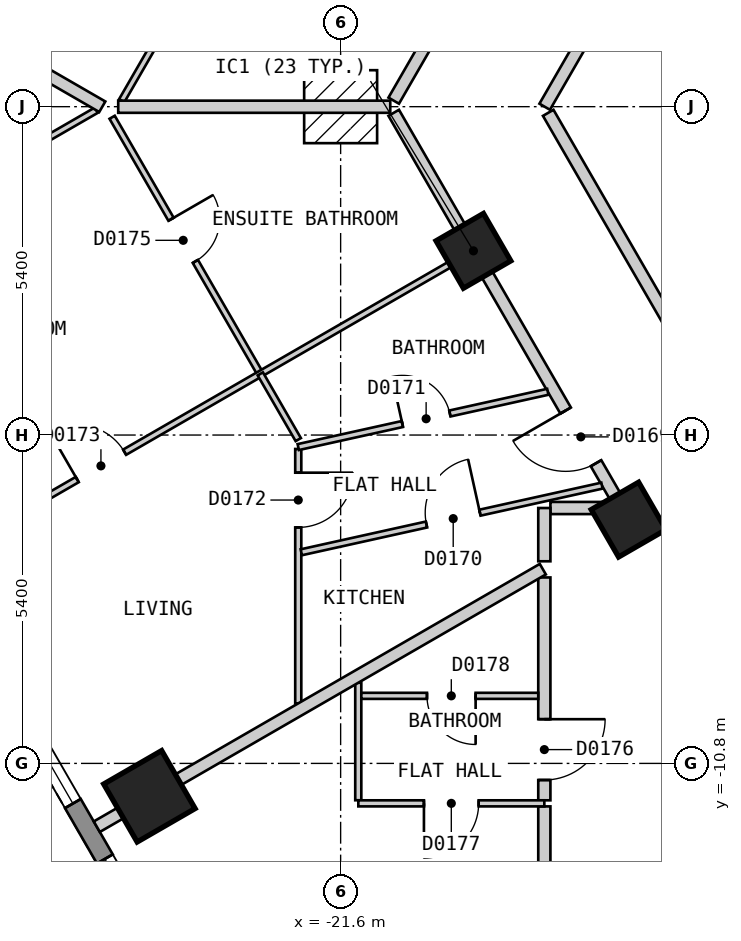
"""IFC4 building model, lengths in metres.
Left out: names, types, materials, properties, quantities, classifications, styles, units other than length and angle.
Written with IfcOpenShell. Run it as: python <this file> out.ifc"""

import sys

from ifc_helpers import new_model, si_unit, direction, frame, frame_2d, origin, origin_2d, place, context, subcontext, project, spatial, polyline, rectangle, outline, extrude, element, fill, save


model = new_model("IFC4")
c1 = context("Model", 3, precision=1e-05, world=origin(), true_north=direction((0.0, 1.0)))
c2 = subcontext(c1, "Body", "Model", "MODEL_VIEW")
j1 = project(units=[si_unit("LENGTHUNIT", "METRE"), si_unit("PLANEANGLEUNIT", "RADIAN")], contexts=[c1])
p1 = place(None, origin())
s1 = spatial("IfcSite", under=j1, at=p1, CompositionType="ELEMENT")
p2 = place(p1, origin())
s2 = spatial("IfcBuilding", under=s1, at=p2, CompositionType="ELEMENT")
p3 = place(p2, frame((0.0, 0.0, 23.4)))
s3 = spatial("IfcBuildingStorey", under=s2, at=p3, CompositionType="ELEMENT", Elevation=23.4)
p4 = place(p3, frame((-24.745, -11.341, 0.0), z_axis=(0.0, 0.0, 1.0), x_axis=(0.499984884929, -0.866034130299, 0.0)))
e1 = element("IfcColumn", 1, at=p4, inside=s3, PredefinedType="COLUMN", context=c2, shape_type="SweptSolid", body=[
    extrude(rectangle(XDim=1.1, YDim=1.1, at=origin_2d()), origin(), (0.0, 0.0, 1.0), 3.0),
])
for number, where, z_axis, x_axis in (
    (2, (-19.416, -2.371, 0.0), (0.0, 0.0, 1.0), (0.5, -0.866, 0.0)),
    (3, (-16.864, -6.791, 0.0), (0.0, 0.0, 1.0), (0.5, -0.866, 0.0)),
):
    element("IfcColumn", number, at=place(p3, frame(where, z_axis=z_axis, x_axis=x_axis)), inside=s3, PredefinedType="COLUMN", context=c2, shape_type="SweptSolid", body=[
        extrude(rectangle(XDim=0.9, YDim=0.9, at=origin_2d()), origin(), (0.0, 0.0, 1.0), 3.0),
    ])
p5 = place(p3, frame((-31.22, -2.425, 0.0), z_axis=(0.0, 0.0, 1.0), x_axis=(0.500001938803, -0.866024284413, 0.0)))
e4 = element("IfcWall", 4, at=p5, inside=s3, PredefinedType="SOLIDWALL", context=c2, shape_type="SweptSolid", body=[
    extrude(outline(polyline([(0.0, -0.15), (27.02, -0.15), (26.94, 0.15), (0.08, 0.15), (0.0, -0.15)])), origin(), (0.0, 0.0, 1.0), 2.7),
])
p6 = place(p5, frame((1.277, 0.0, 0.15)))
e5 = element("IfcOpeningElement", 5, at=p6, cuts=e4, PredefinedType="OPENING", context=c2, shape_type="SweptSolid", body=[
    extrude(rectangle(XDim=1.5, YDim=2.1, at=frame_2d((0.75, 1.05))), frame((0.0, 0.16, 0.0), z_axis=(0.0, -1.0, 0.0), x_axis=(1.0, 0.0, 0.0)), (0.0, 0.0, 1.0), 0.32),
])
p7 = place(p5, frame((3.829, 0.0, 0.15)))
e6 = element("IfcOpeningElement", 6, at=p7, cuts=e4, PredefinedType="OPENING", context=c2, shape_type="SweptSolid", body=[
    extrude(rectangle(XDim=1.5, YDim=2.1, at=frame_2d((0.75, 1.05))), frame((0.0, 0.16, 0.0), z_axis=(0.0, -1.0, 0.0), x_axis=(1.0, 0.0, 0.0)), (0.0, 0.0, 1.0), 0.32),
])
p8 = place(p5, frame((6.382, 0.0, 0.15)))
e7 = element("IfcOpeningElement", 7, at=p8, cuts=e4, PredefinedType="OPENING", context=c2, shape_type="SweptSolid", body=[
    extrude(rectangle(XDim=1.5, YDim=2.1, at=frame_2d((0.75, 1.05))), frame((0.0, 0.16, 0.0), z_axis=(0.0, -1.0, 0.0), x_axis=(1.0, 0.0, 0.0)), (0.0, 0.0, 1.0), 0.32),
])
p9 = place(p5, frame((8.933, 0.0, 0.15)))
e8 = element("IfcOpeningElement", 8, at=p9, cuts=e4, PredefinedType="OPENING", context=c2, shape_type="SweptSolid", body=[
    extrude(rectangle(XDim=1.5, YDim=2.1, at=frame_2d((0.75, 1.05))), frame((0.0, 0.16, 0.0), z_axis=(0.0, -1.0, 0.0), x_axis=(1.0, 0.0, 0.0)), (0.0, 0.0, 1.0), 0.32),
])
p10 = place(p5, frame((11.485, 0.0, 0.15)))
e9 = element("IfcOpeningElement", 9, at=p10, cuts=e4, PredefinedType="OPENING", context=c2, shape_type="SweptSolid", body=[
    extrude(rectangle(XDim=1.5, YDim=2.1, at=frame_2d((0.75, 1.05))), frame((0.0, 0.16, 0.0), z_axis=(0.0, -1.0, 0.0), x_axis=(1.0, 0.0, 0.0)), (0.0, 0.0, 1.0), 0.32),
])
p11 = place(p5, frame((14.037, 0.0, 0.15)))
e10 = element("IfcOpeningElement", 10, at=p11, cuts=e4, PredefinedType="OPENING", context=c2, shape_type="SweptSolid", body=[
    extrude(rectangle(XDim=1.5, YDim=2.1, at=frame_2d((0.75, 1.05))), frame((0.0, 0.16, 0.0), z_axis=(0.0, -1.0, 0.0), x_axis=(1.0, 0.0, 0.0)), (0.0, 0.0, 1.0), 0.32),
])
p12 = place(p5, frame((16.589, 0.0, 0.15)))
e11 = element("IfcOpeningElement", 11, at=p12, cuts=e4, PredefinedType="OPENING", context=c2, shape_type="SweptSolid", body=[
    extrude(rectangle(XDim=1.5, YDim=2.1, at=frame_2d((0.75, 1.05))), frame((0.0, 0.16, 0.0), z_axis=(0.0, -1.0, 0.0), x_axis=(1.0, 0.0, 0.0)), (0.0, 0.0, 1.0), 0.32),
])
p13 = place(p5, frame((19.141, 0.0, 0.15)))
e12 = element("IfcOpeningElement", 12, at=p13, cuts=e4, PredefinedType="OPENING", context=c2, shape_type="SweptSolid", body=[
    extrude(rectangle(XDim=1.5, YDim=2.1, at=frame_2d((0.75, 1.05))), frame((0.0, 0.16, 0.0), z_axis=(0.0, -1.0, 0.0), x_axis=(1.0, 0.0, 0.0)), (0.0, 0.0, 1.0), 0.32),
])
p14 = place(p5, frame((21.693, 0.0, 0.15)))
e13 = element("IfcOpeningElement", 13, at=p14, cuts=e4, PredefinedType="OPENING", context=c2, shape_type="SweptSolid", body=[
    extrude(rectangle(XDim=1.5, YDim=2.1, at=frame_2d((0.75, 1.05))), frame((0.0, 0.16, 0.0), z_axis=(0.0, -1.0, 0.0), x_axis=(1.0, 0.0, 0.0)), (0.0, 0.0, 1.0), 0.32),
])
p15 = place(p5, frame((24.244, 0.0, 0.15)))
e14 = element("IfcOpeningElement", 14, at=p15, cuts=e4, PredefinedType="OPENING", context=c2, shape_type="SweptSolid", body=[
    extrude(rectangle(XDim=1.5, YDim=2.1, at=frame_2d((0.75, 1.05))), frame((0.0, 0.16, 0.0), z_axis=(0.0, -1.0, 0.0), x_axis=(1.0, 0.0, 0.0)), (0.0, 0.0, 1.0), 0.32),
])
p16 = place(p3, frame((-18.186, -0.101, 0.0), z_axis=(0.0, 0.0, 1.0), x_axis=(0.499997591167, -0.86602679452, 0.0)))
e15 = element("IfcWall", 15, at=p16, inside=s3, PredefinedType="PARTITIONING", context=c2, shape_type="SweptSolid", body=[
    extrude(rectangle(XDim=5.172, YDim=0.2, at=frame_2d((2.586, 0.0))), origin(), (0.0, 0.0, 1.0), 2.7),
])
p17 = place(p3, frame((-20.727, -0.101, 0.0), z_axis=(0.0, 0.0, 1.0), x_axis=(0.500065652488, -0.865987495984, 0.0)))
e16 = element("IfcWall", 16, at=p17, inside=s3, PredefinedType="PARTITIONING", context=c2, shape_type="SweptSolid", body=[
    extrude(rectangle(XDim=7.389, YDim=0.2, at=frame_2d((3.695, 0.0))), origin(), (0.0, 0.0, 1.0), 2.7),
])
p18 = place(p17, frame((5.654, 0.0, 0.0)))
e17 = element("IfcOpeningElement", 17, at=p18, cuts=e16, PredefinedType="OPENING", context=c2, shape_type="SweptSolid", body=[
    extrude(rectangle(XDim=1.0, YDim=2.1, at=frame_2d((0.5, 1.05))), frame((0.0, 0.11, 0.0), z_axis=(0.0, -1.0, 0.0), x_axis=(1.0, 0.0, 0.0)), (0.0, 0.0, 1.0), 0.22),
])
p19 = place(p3, frame((-18.25, -11.507, 0.0), z_axis=(0.0, 0.0, 1.0), x_axis=(0.0, -1.0, 0.0)))
e18 = element("IfcWall", 18, at=p19, inside=s3, PredefinedType="PARTITIONING", context=c2, shape_type="SweptSolid", body=[
    extrude(rectangle(XDim=1.862, YDim=0.2, at=frame_2d((0.931, 0.0))), origin(), (0.0, 0.0, 1.0), 2.7),
])
p20 = place(p3, frame((-18.15, -6.6, 0.0), z_axis=(0.0, 0.0, 1.0), x_axis=(1.0, 0.0, 0.0)))
e19 = element("IfcWall", 19, at=p20, inside=s3, PredefinedType="PARTITIONING", context=c2, shape_type="SweptSolid", body=[
    extrude(rectangle(XDim=1.176, YDim=0.2, at=frame_2d((0.588, 0.0))), origin(), (0.0, 0.0, 1.0), 2.7),
])
p21 = place(p3, frame((-18.244, -0.001, 0.0), z_axis=(0.0, 0.0, 1.0), x_axis=(0.499962999376, 0.866046765051, 0.0)))
e20 = element("IfcWall", 20, at=p21, inside=s3, PredefinedType="PARTITIONING", context=c2, shape_type="SweptSolid", body=[
    extrude(rectangle(XDim=18.245, YDim=0.2, at=frame_2d((9.123, 0.0))), origin(), (0.0, 0.0, 1.0), 2.7),
])
p22 = place(p21, frame((8.672, 0.0, 0.0)))
e21 = element("IfcOpeningElement", 21, at=p22, cuts=e20, PredefinedType="OPENING", context=c2, shape_type="SweptSolid", body=[
    extrude(rectangle(XDim=0.9, YDim=2.1, at=frame_2d((0.45, 1.05))), frame((0.0, 0.11, 0.0), z_axis=(0.0, -1.0, 0.0), x_axis=(1.0, 0.0, 0.0)), (0.0, 0.0, 1.0), 0.22),
])
p23 = place(p3, frame((-20.727, 0.099, 0.0), z_axis=(0.0, 0.0, 1.0), x_axis=(0.499993204491, 0.866029327138, 0.0)))
e22 = element("IfcWall", 22, at=p23, inside=s3, PredefinedType="PARTITIONING", context=c2, shape_type="SweptSolid", body=[
    extrude(rectangle(XDim=20.554, YDim=0.2, at=frame_2d((10.277, 0.0))), origin(), (0.0, 0.0, 1.0), 2.7),
])
p24 = place(p23, frame((14.88, 0.0, 0.0)))
e23 = element("IfcOpeningElement", 23, at=p24, cuts=e22, PredefinedType="OPENING", context=c2, shape_type="SweptSolid", body=[
    extrude(rectangle(XDim=1.0, YDim=2.1, at=frame_2d((0.5, 1.05))), frame((0.0, 0.11, 0.0), z_axis=(0.0, -1.0, 0.0), x_axis=(1.0, 0.0, 0.0)), (0.0, 0.0, 1.0), 0.22),
])
p25 = place(p23, frame((4.673, 0.0, 0.0)))
e24 = element("IfcOpeningElement", 24, at=p25, cuts=e22, PredefinedType="OPENING", context=c2, shape_type="SweptSolid", body=[
    extrude(rectangle(XDim=1.0, YDim=2.1, at=frame_2d((0.5, 1.05))), frame((0.0, 0.11, 0.0), z_axis=(0.0, -1.0, 0.0), x_axis=(1.0, 0.0, 0.0)), (0.0, 0.0, 1.0), 0.22),
])
p26 = place(p3, frame((-18.25, -11.407, 0.0), z_axis=(0.0, 0.0, 1.0), x_axis=(0.0, 1.0, 0.0)))
e25 = element("IfcWall", 25, at=p26, inside=s3, PredefinedType="PARTITIONING", context=c2, shape_type="SweptSolid", body=[
    extrude(rectangle(XDim=3.665, YDim=0.2, at=frame_2d((1.833, 0.0))), origin(), (0.0, 0.0, 1.0), 2.7),
])
p27 = place(p26, frame((0.334, 0.0, 0.0)))
e26 = element("IfcOpeningElement", 26, at=p27, cuts=e25, PredefinedType="OPENING", context=c2, shape_type="SweptSolid", body=[
    extrude(rectangle(XDim=1.0, YDim=2.1, at=frame_2d((0.5, 1.05))), frame((0.0, 0.11, 0.0), z_axis=(0.0, -1.0, 0.0), x_axis=(1.0, 0.0, 0.0)), (0.0, 0.0, 1.0), 0.22),
])
p28 = place(p3, frame((-18.25, -7.476, 0.0), z_axis=(0.0, 0.0, 1.0), x_axis=(0.0, 1.0, 0.0)))
e27 = element("IfcWall", 27, at=p28, inside=s3, PredefinedType="PARTITIONING", context=c2, shape_type="SweptSolid", body=[
    extrude(rectangle(XDim=0.876, YDim=0.2, at=frame_2d((0.438, 0.0))), origin(), (0.0, 0.0, 1.0), 2.7),
])
p29 = place(p3, frame((-25.358, -0.174, 0.0), z_axis=(0.0, 0.0, 1.0), x_axis=(0.500093956194, -0.865971151354, 0.0)))
e28 = element("IfcWall", 28, at=p29, inside=s3, PredefinedType="PARTITIONING", context=c2, shape_type="SweptSolid", body=[
    extrude(rectangle(XDim=4.873, YDim=0.1, at=frame_2d((2.437, 0.0))), origin(), (0.0, 0.0, 1.0), 2.7),
])
p30 = place(p29, frame((1.937, 0.0, 0.0)))
e29 = element("IfcOpeningElement", 29, at=p30, cuts=e28, PredefinedType="OPENING", context=c2, shape_type="SweptSolid", body=[
    extrude(rectangle(XDim=0.8, YDim=2.1, at=frame_2d((0.4, 1.05))), frame((0.0, 0.06, 0.0), z_axis=(0.0, -1.0, 0.0), x_axis=(1.0, 0.0, 0.0)), (0.0, 0.0, 1.0), 0.12),
])
p31 = place(p3, frame((-21.31, -9.474, 0.0), z_axis=(0.0, 0.0, 1.0), x_axis=(0.0, -1.0, 0.0)))
e30 = element("IfcWall", 30, at=p31, inside=s3, PredefinedType="PARTITIONING", context=c2, shape_type="SweptSolid", body=[
    extrude(rectangle(XDim=1.932, YDim=0.1, at=frame_2d((0.966, 0.0))), origin(), (0.0, 0.0, 1.0), 2.7),
])
p32 = place(p3, frame((-21.26, -9.689, 0.0), z_axis=(0.0, 0.0, 1.0), x_axis=(1.0, 0.0, 0.0)))
e31 = element("IfcWall", 31, at=p32, inside=s3, PredefinedType="PARTITIONING", context=c2, shape_type="SweptSolid", body=[
    extrude(rectangle(XDim=2.91, YDim=0.1, at=frame_2d((1.455, 0.0))), origin(), (0.0, 0.0, 1.0), 2.7),
])
p33 = place(p32, frame((1.08, 0.0, 0.0)))
e32 = element("IfcOpeningElement", 32, at=p33, cuts=e31, PredefinedType="OPENING", context=c2, shape_type="SweptSolid", body=[
    extrude(rectangle(XDim=0.8, YDim=2.1, at=frame_2d((0.4, 1.05))), frame((0.0, 0.06, 0.0), z_axis=(0.0, -1.0, 0.0), x_axis=(1.0, 0.0, 0.0)), (0.0, 0.0, 1.0), 0.12),
])
p34 = place(p3, frame((-21.309, -11.457, 0.0), z_axis=(0.0, 0.0, 1.0), x_axis=(1.0, 0.0, 0.0)))
e33 = element("IfcWall", 33, at=p34, inside=s3, PredefinedType="PARTITIONING", context=c2, shape_type="SweptSolid", body=[
    extrude(rectangle(XDim=3.059, YDim=0.1, at=frame_2d((1.53, 0.0))), origin(), (0.0, 0.0, 1.0), 2.7),
])
p35 = place(p34, frame((1.079, 0.0, 0.0)))
e34 = element("IfcOpeningElement", 34, at=p35, cuts=e33, PredefinedType="OPENING", context=c2, shape_type="SweptSolid", body=[
    extrude(rectangle(XDim=0.9, YDim=2.1, at=frame_2d((0.45, 1.05))), frame((0.0, 0.06, 0.0), z_axis=(0.0, -1.0, 0.0), x_axis=(1.0, 0.0, 0.0)), (0.0, 0.0, 1.0), 0.12),
])
p36 = place(p3, frame((-25.2, 0.099, 0.0), z_axis=(0.0, 0.0, 1.0), x_axis=(0.49997477318, 0.866039968006, 0.0)))
e35 = element("IfcWall", 35, at=p36, inside=s3, PredefinedType="PARTITIONING", context=c2, shape_type="SweptSolid", body=[
    extrude(rectangle(XDim=14.965, YDim=0.1, at=frame_2d((7.482, 0.0))), origin(), (0.0, 0.0, 1.0), 2.7),
])
p37 = place(p36, frame((6.96, 0.0, 0.0)))
e36 = element("IfcOpeningElement", 36, at=p37, cuts=e35, PredefinedType="OPENING", context=c2, shape_type="SweptSolid", body=[
    extrude(rectangle(XDim=0.9, YDim=2.1, at=frame_2d((0.45, 1.05))), frame((0.0, 0.06, 0.0), z_axis=(0.0, -1.0, 0.0), x_axis=(1.0, 0.0, 0.0)), (0.0, 0.0, 1.0), 0.12),
])
p38 = place(p3, frame((-22.297, -9.813, 0.0), z_axis=(0.0, 0.0, 1.0), x_axis=(0.0, 1.0, 0.0)))
e37 = element("IfcWall", 37, at=p38, inside=s3, PredefinedType="PARTITIONING", context=c2, shape_type="SweptSolid", body=[
    extrude(rectangle(XDim=4.184, YDim=0.1, at=frame_2d((2.092, 0.0))), origin(), (0.0, 0.0, 1.0), 2.7),
])
p39 = place(p38, frame((2.894, 0.0, 0.0)))
e38 = element("IfcOpeningElement", 38, at=p39, cuts=e37, PredefinedType="OPENING", context=c2, shape_type="SweptSolid", body=[
    extrude(rectangle(XDim=0.9, YDim=2.1, at=frame_2d((0.45, 1.05))), frame((0.0, 0.06, 0.0), z_axis=(0.0, -1.0, 0.0), x_axis=(1.0, 0.0, 0.0)), (0.0, 0.0, 1.0), 0.12),
])
p40 = place(p3, frame((-22.297, -5.598, 0.0), z_axis=(0.0, 0.0, 1.0), x_axis=(0.976341239907, 0.216235481033, 0.0)))
e39 = element("IfcWall", 39, at=p40, inside=s3, PredefinedType="PARTITIONING", context=c2, shape_type="SweptSolid", body=[
    extrude(rectangle(XDim=4.203, YDim=0.1, at=frame_2d((2.102, 0.0))), origin(), (0.0, 0.0, 1.0), 2.7),
])
p41 = place(p40, frame((1.754, 0.0, 0.0)))
e40 = element("IfcOpeningElement", 40, at=p41, cuts=e39, PredefinedType="OPENING", context=c2, shape_type="SweptSolid", body=[
    extrude(rectangle(XDim=0.8, YDim=2.1, at=frame_2d((0.4, 1.05))), frame((0.0, 0.06, 0.0), z_axis=(0.0, -1.0, 0.0), x_axis=(1.0, 0.0, 0.0)), (0.0, 0.0, 1.0), 0.12),
])
p42 = place(p3, frame((-22.247, -7.328, 0.0), z_axis=(0.0, 0.0, 1.0), x_axis=(0.976310522972, 0.216374126765, 0.0)))
e41 = element("IfcWall", 41, at=p42, inside=s3, PredefinedType="PARTITIONING", context=c2, shape_type="SweptSolid", body=[
    extrude(rectangle(XDim=5.065, YDim=0.1, at=frame_2d((2.532, 0.0))), origin(), (0.0, 0.0, 1.0), 2.7),
])
p43 = place(p42, frame((2.109, 0.0, 0.0)))
e42 = element("IfcOpeningElement", 42, at=p43, cuts=e41, PredefinedType="OPENING", context=c2, shape_type="SweptSolid", body=[
    extrude(rectangle(XDim=0.9, YDim=2.1, at=frame_2d((0.45, 1.05))), frame((0.0, 0.06, 0.0), z_axis=(0.0, -1.0, 0.0), x_axis=(1.0, 0.0, 0.0)), (0.0, 0.0, 1.0), 0.12),
])
p44 = place(p3, frame((-28.163, -7.42, 0.0), z_axis=(0.0, 0.0, 1.0), x_axis=(0.866065245018, 0.499930986609, 0.0)))
e43 = element("IfcWall", 43, at=p44, inside=s3, PredefinedType="PARTITIONING", context=c2, shape_type="SweptSolid", body=[
    extrude(rectangle(XDim=10.0, YDim=0.1, at=frame_2d((5.0, 0.0))), origin(), (0.0, 0.0, 1.0), 2.7),
])
p45 = place(p44, frame((2.576, 0.0, 0.0)))
e44 = element("IfcOpeningElement", 44, at=p45, cuts=e43, PredefinedType="OPENING", context=c2, shape_type="SweptSolid", body=[
    extrude(rectangle(XDim=0.9, YDim=2.1, at=frame_2d((0.45, 1.05))), frame((0.0, 0.06, 0.0), z_axis=(0.0, -1.0, 0.0), x_axis=(1.0, 0.0, 0.0)), (0.0, 0.0, 1.0), 0.12),
])
p46 = place(p3, frame((-30.715, -3.0, 0.0), z_axis=(0.0, 0.0, 1.0), x_axis=(0.866054318203, 0.499949915414, 0.0)))
e45 = element("IfcWall", 45, at=p46, inside=s3, PredefinedType="PARTITIONING", context=c2, shape_type="SweptSolid", body=[
    extrude(rectangle(XDim=5.884, YDim=0.1, at=frame_2d((2.942, 0.0))), origin(), (0.0, 0.0, 1.0), 2.7),
])
p47 = place(p46, frame((2.55, 0.0, 0.0)))
e46 = element("IfcOpeningElement", 46, at=p47, cuts=e45, PredefinedType="OPENING", context=c2, shape_type="SweptSolid", body=[
    extrude(rectangle(XDim=0.9, YDim=2.1, at=frame_2d((0.45, 1.05))), frame((0.0, 0.06, 0.0), z_axis=(0.0, -1.0, 0.0), x_axis=(1.0, 0.0, 0.0)), (0.0, 0.0, 1.0), 0.12),
])
p48 = place(p3, frame((-30.716, 2.999, 0.0), z_axis=(0.0, 0.0, 1.0), x_axis=(0.866020924479, -0.500007758305, 0.0)))
e47 = element("IfcWall", 47, at=p48, inside=s3, PredefinedType="PARTITIONING", context=c2, shape_type="SweptSolid", body=[
    extrude(rectangle(XDim=6.0, YDim=0.2, at=frame_2d((3.0, 0.0))), origin(), (0.0, 0.0, 1.0), 2.7),
])
p49 = place(p3, frame((-25.258, -0.001, 0.0), z_axis=(0.0, 0.0, 1.0), x_axis=(1.0, 0.0, 0.0)))
e48 = element("IfcWall", 48, at=p49, inside=s3, PredefinedType="PARTITIONING", context=c2, shape_type="SweptSolid", body=[
    extrude(rectangle(XDim=4.474, YDim=0.2, at=frame_2d((2.237, 0.0))), origin(), (0.0, 0.0, 1.0), 2.7),
])
p50 = place(p3, frame((-25.61, -11.841, 0.0), z_axis=(0.0, 0.0, 1.0), x_axis=(0.866019023803, 0.500011050288, 0.0)))
e49 = element("IfcWall", 49, at=p50, inside=s3, PredefinedType="PARTITIONING", context=c2, shape_type="SweptSolid", body=[
    extrude(rectangle(XDim=8.47, YDim=0.2, at=frame_2d((4.235, 0.0))), origin(), (0.0, 0.0, 1.0), 2.7),
])
p51 = place(p3, frame((-22.921, -4.394, 0.0), z_axis=(0.0, 0.0, 1.0), x_axis=(0.49977889874, -0.86615301903, 0.0)))
e50 = element("IfcWall", 50, at=p51, inside=s3, PredefinedType="PARTITIONING", context=c2, shape_type="SweptSolid", body=[
    extrude(rectangle(XDim=1.248, YDim=0.1, at=frame_2d((0.624, 0.0))), origin(), (0.0, 0.0, 1.0), 2.7),
])
p52 = place(p9, origin())
e51 = element("IfcWindow", 51, at=p52, inside=s3, PartitioningType="SINGLE_PANEL", PredefinedType="WINDOW", context=c2, shape_type="SweptSolid", body=[
    extrude(rectangle(XDim=1.5, YDim=2.1, at=frame_2d((0.75, 1.05))), frame((0.0, 0.03, 0.0), z_axis=(0.0, -1.0, 0.0), x_axis=(1.0, 0.0, 0.0)), (0.0, 0.0, 1.0), 0.06),
])
fill(e8, e51)
p53 = place(p10, origin())
e52 = element("IfcWindow", 52, at=p53, inside=s3, PartitioningType="SINGLE_PANEL", PredefinedType="WINDOW", context=c2, shape_type="SweptSolid", body=[
    extrude(rectangle(XDim=1.5, YDim=2.1, at=frame_2d((0.75, 1.05))), frame((0.0, 0.03, 0.0), z_axis=(0.0, -1.0, 0.0), x_axis=(1.0, 0.0, 0.0)), (0.0, 0.0, 1.0), 0.06),
])
fill(e9, e52)
p54 = place(p18, origin())
e53 = element("IfcDoor", 53, at=p54, inside=s3, OperationType="SINGLE_SWING_LEFT", PredefinedType="DOOR", context=c2, shape_type="SweptSolid", body=[
    extrude(rectangle(XDim=1.0, YDim=2.1, at=frame_2d((0.5, 1.05))), frame((0.0, 0.025, 0.0), z_axis=(0.0, -1.0, 0.0), x_axis=(1.0, 0.0, 0.0)), (0.0, 0.0, 1.0), 0.05),
])
fill(e17, e53)
p55 = place(p43, origin())
e54 = element("IfcDoor", 54, at=p55, inside=s3, OperationType="SINGLE_SWING_RIGHT", PredefinedType="DOOR", context=c2, shape_type="SweptSolid", body=[
    extrude(rectangle(XDim=0.9, YDim=2.1, at=frame_2d((0.45, 1.05))), frame((0.0, 0.025, 0.0), z_axis=(0.0, -1.0, 0.0), x_axis=(1.0, 0.0, 0.0)), (0.0, 0.0, 1.0), 0.05),
])
fill(e42, e54)
p56 = place(p41, origin())
e55 = element("IfcDoor", 55, at=p56, inside=s3, OperationType="SINGLE_SWING_LEFT", PredefinedType="DOOR", context=c2, shape_type="SweptSolid", body=[
    extrude(rectangle(XDim=0.8, YDim=2.1, at=frame_2d((0.4, 1.05))), frame((0.0, 0.025, 0.0), z_axis=(0.0, -1.0, 0.0), x_axis=(1.0, 0.0, 0.0)), (0.0, 0.0, 1.0), 0.05),
])
fill(e40, e55)
p57 = place(p39, origin())
e56 = element("IfcDoor", 56, at=p57, inside=s3, OperationType="SINGLE_SWING_RIGHT", PredefinedType="DOOR", context=c2, shape_type="SweptSolid", body=[
    extrude(rectangle(XDim=0.9, YDim=2.1, at=frame_2d((0.45, 1.05))), frame((0.0, 0.025, 0.0), z_axis=(0.0, -1.0, 0.0), x_axis=(1.0, 0.0, 0.0)), (0.0, 0.0, 1.0), 0.05),
])
fill(e38, e56)
p58 = place(p45, origin())
e57 = element("IfcDoor", 57, at=p58, inside=s3, OperationType="SINGLE_SWING_LEFT", PredefinedType="DOOR", context=c2, shape_type="SweptSolid", body=[
    extrude(rectangle(XDim=0.9, YDim=2.1, at=frame_2d((0.45, 1.05))), frame((0.0, 0.025, 0.0), z_axis=(0.0, -1.0, 0.0), x_axis=(1.0, 0.0, 0.0)), (0.0, 0.0, 1.0), 0.05),
])
fill(e44, e57)
p59 = place(p30, origin())
e58 = element("IfcDoor", 58, at=p59, inside=s3, OperationType="SINGLE_SWING_LEFT", PredefinedType="DOOR", context=c2, shape_type="SweptSolid", body=[
    extrude(rectangle(XDim=0.8, YDim=2.1, at=frame_2d((0.4, 1.05))), frame((0.0, 0.025, 0.0), z_axis=(0.0, -1.0, 0.0), x_axis=(1.0, 0.0, 0.0)), (0.0, 0.0, 1.0), 0.05),
])
fill(e29, e58)
p60 = place(p27, origin())
e59 = element("IfcDoor", 59, at=p60, inside=s3, OperationType="SINGLE_SWING_RIGHT", PredefinedType="DOOR", context=c2, shape_type="SweptSolid", body=[
    extrude(rectangle(XDim=1.0, YDim=2.1, at=frame_2d((0.5, 1.05))), frame((0.0, 0.025, 0.0), z_axis=(0.0, -1.0, 0.0), x_axis=(1.0, 0.0, 0.0)), (0.0, 0.0, 1.0), 0.05),
])
fill(e26, e59)
p61 = place(p35, origin())
e60 = element("IfcDoor", 60, at=p61, inside=s3, OperationType="SINGLE_SWING_LEFT", PredefinedType="DOOR", context=c2, shape_type="SweptSolid", body=[
    extrude(rectangle(XDim=0.9, YDim=2.1, at=frame_2d((0.45, 1.05))), frame((0.0, 0.025, 0.0), z_axis=(0.0, -1.0, 0.0), x_axis=(1.0, 0.0, 0.0)), (0.0, 0.0, 1.0), 0.05),
])
fill(e34, e60)
p62 = place(p33, origin())
e61 = element("IfcDoor", 61, at=p62, inside=s3, OperationType="SINGLE_SWING_RIGHT", PredefinedType="DOOR", context=c2, shape_type="SweptSolid", body=[
    extrude(rectangle(XDim=0.8, YDim=2.1, at=frame_2d((0.4, 1.05))), frame((0.0, 0.025, 0.0), z_axis=(0.0, -1.0, 0.0), x_axis=(1.0, 0.0, 0.0)), (0.0, 0.0, 1.0), 0.05),
])
fill(e32, e61)
save(model, sys.argv[1])
